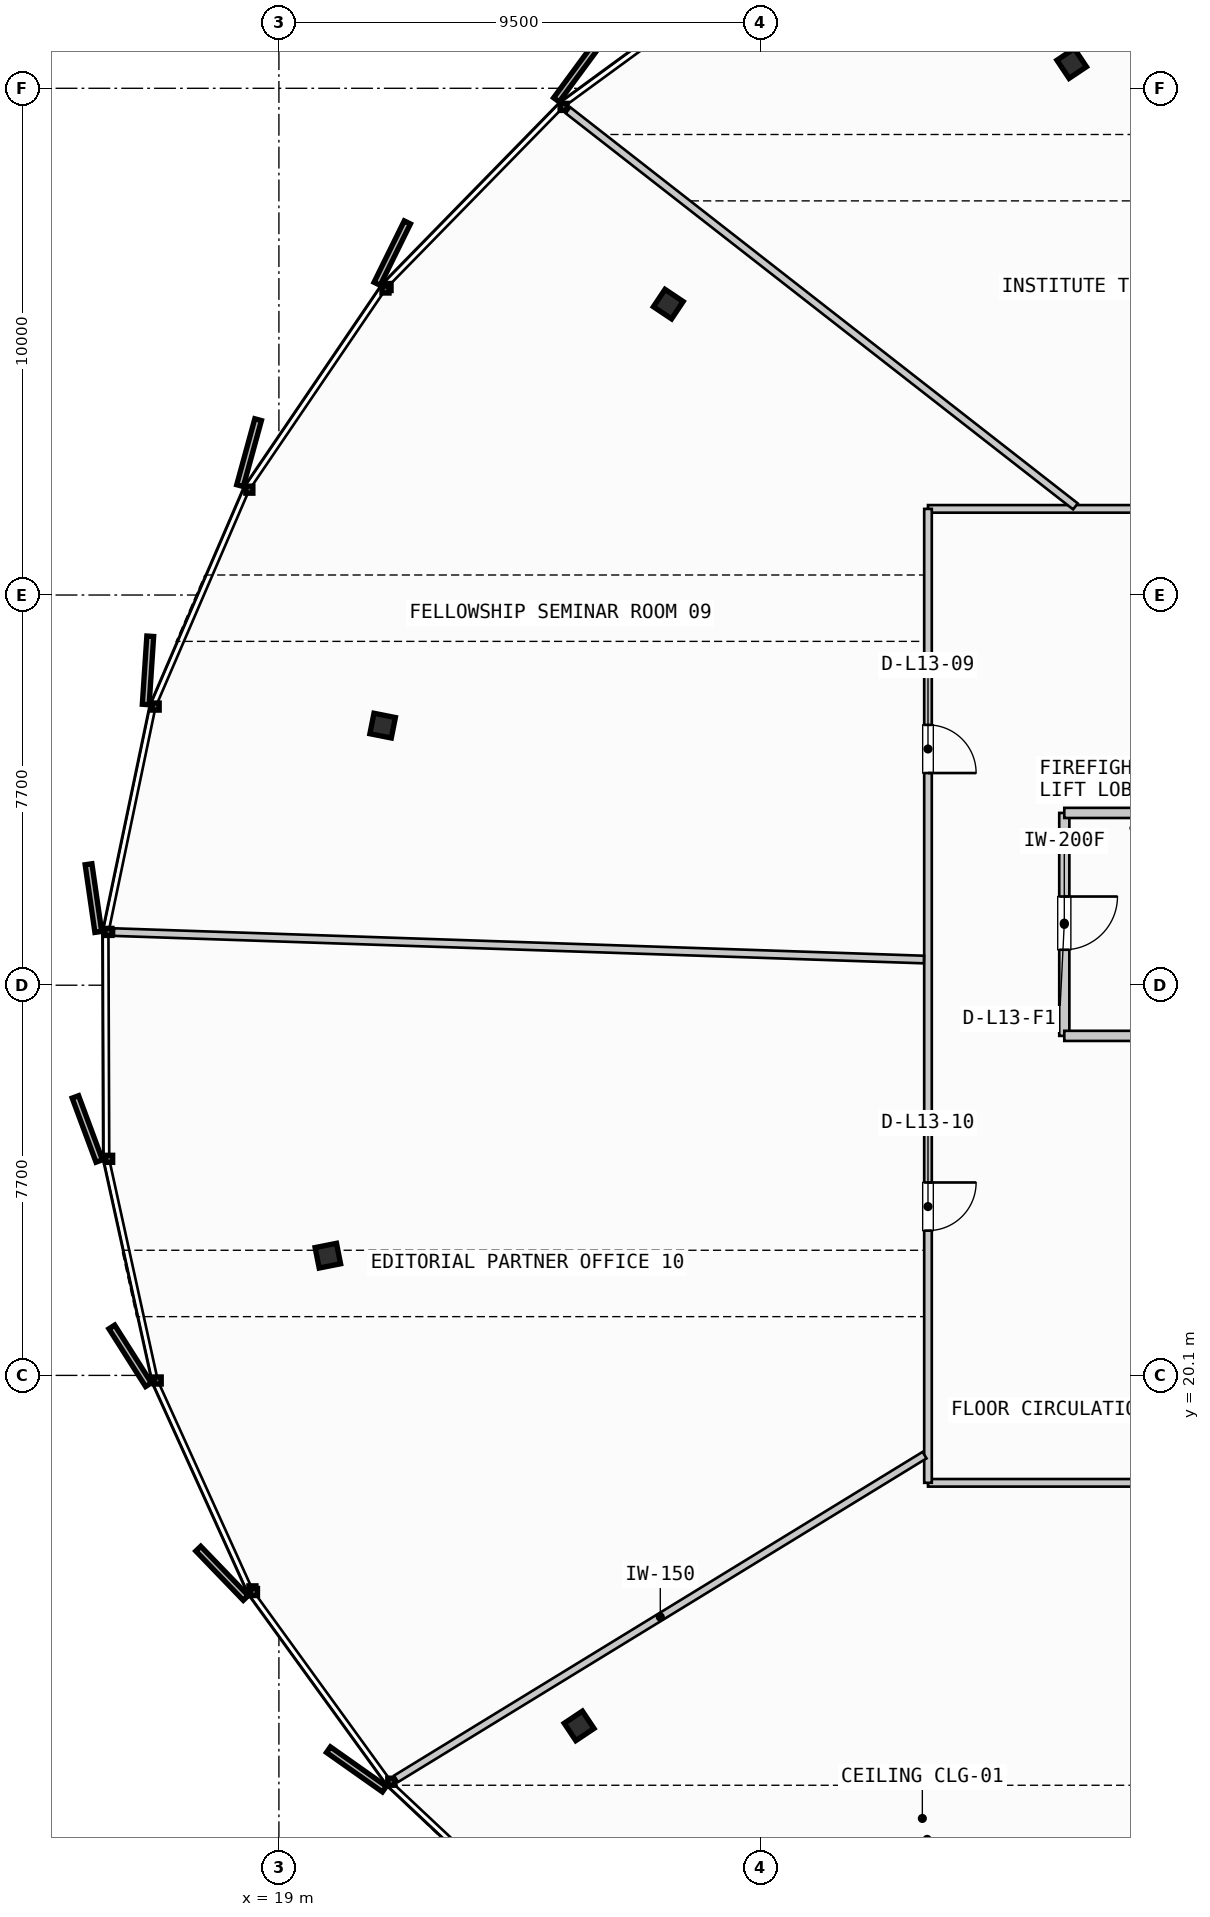
"""IFC4 building model, lengths in metres.
Left out: names, types, materials, properties, quantities, classifications, styles, units other than length and angle.
Written with IfcOpenShell. Run it as: python <this file> out.ifc"""

import sys

from ifc_helpers import new_model, si_unit, direction, frame, frame_2d, origin, origin_2d, place, context, subcontext, project, spatial, rectangle, i_section, extrude, source, transform, mapped, element, fill, save


model = new_model("IFC4")
c1 = context("Model", 3, precision=1e-05, world=origin(), true_north=direction((0.0, 1.0)))
c2 = subcontext(c1, "Body", "Model", "MODEL_VIEW")
j1 = project(units=[si_unit("LENGTHUNIT", "METRE"), si_unit("PLANEANGLEUNIT", "RADIAN")], contexts=[c1])
p1 = place(None, origin())
s1 = spatial("IfcSite", under=j1, at=p1, CompositionType="ELEMENT")
p2 = place(p1, origin())
s2 = spatial("IfcBuilding", under=s1, at=p2, CompositionType="ELEMENT")
p3 = place(p2, frame((0.0, 0.0, 56.2)))
s3 = spatial("IfcBuildingStorey", under=s2, at=p3, CompositionType="ELEMENT", Elevation=56.2)
m1 = source(origin(), c2, "Body", "SweptSolid", [
    extrude(i_section(OverallWidth=0.412, OverallDepth=0.431, WebThickness=0.042, FlangeThickness=0.068, FilletRadius=0.015, at=origin_2d()), origin(), (0.0, 0.0, 1.0), 3.55),
])
for number, where, z_axis, x_axis in (
    (1, (34.646, 45.99, 0.0), (0.0, 0.0, 1.0), (-0.556, 0.831, 0.0)),
    (2, (26.685, 41.241, 0.0), (0.0, 0.0, 1.0), (-0.831, 0.556, 0.0)),
    (3, (21.047, 32.923, 0.0), (0.0, 0.0, 1.0), (-0.981, 0.195, 0.0)),
    (4, (19.966, 22.462, 0.0), (0.0, 0.0, 1.0), (-0.981, -0.195, 0.0)),
    (5, (24.925, 13.183, 0.0), (0.0, 0.0, 1.0), (-0.831, -0.556, 0.0)),
):
    element("IfcColumn", number, at=place(p3, frame(where, z_axis=z_axis, x_axis=x_axis)), inside=s3, PredefinedType="COLUMN", context=c2, shape_type="MappedRepresentation", body=[
        mapped(m1, transform((0.0, 0.0, 0.0), scale=1.0)),
    ])
p4 = place(p3, frame((34.5, 31.2, 0.0), z_axis=(0.0, 0.0, 1.0), x_axis=(0.0, -1.0, 0.0)))
e6 = element("IfcWall", 6, at=p4, inside=s3, PredefinedType="PARTITIONING", context=c2, shape_type="SweptSolid", body=[
    extrude(rectangle(XDim=4.4, YDim=0.2, at=frame_2d((2.2, 0.0))), origin(), (0.0, 0.0, 1.0), 2.645),
])
p5 = place(p4, frame((1.65, 0.0, 0.0)))
e7 = element("IfcOpeningElement", 7, at=p5, cuts=e6, PredefinedType="OPENING", context=c2, shape_type="SweptSolid", body=[
    extrude(rectangle(XDim=1.05, YDim=2.15, at=frame_2d((0.525, 1.075))), frame((0.0, 0.11, 0.0), z_axis=(0.0, -1.0, 0.0), x_axis=(1.0, 0.0, 0.0)), (0.0, 0.0, 1.0), 0.22),
])
for number, where, z_axis, x_axis in (
    (8, (34.5, 26.8, 0.0), (0.0, 0.0, 1.0), (1.0, 0.0, 0.0)),
    (9, (34.5, 31.2, 0.0), (0.0, 0.0, 1.0), (1.0, 0.0, 0.0)),
):
    element("IfcWall", number, at=place(p3, frame(where, z_axis=z_axis, x_axis=x_axis)), inside=s3, PredefinedType="PARTITIONING", context=c2, shape_type="SweptSolid", body=[
        extrude(rectangle(XDim=3.14, YDim=0.2, at=frame_2d((1.57, 0.0))), origin(), (0.0, 0.0, 1.0), 2.645),
    ])
p6 = place(p3, frame((31.81, 17.98, 0.0), z_axis=(0.0, 0.0, 1.0), x_axis=(1.0, 0.0, 0.0)))
e10 = element("IfcWall", 10, at=p6, inside=s3, PredefinedType="PARTITIONING", context=c2, shape_type="SweptSolid", body=[
    extrude(rectangle(XDim=29.98, YDim=0.15, at=frame_2d((14.99, 0.0))), origin(), (0.0, 0.0, 1.0), 2.645),
])
p7 = place(p6, frame((5.749, 0.0, 0.0)))
e11 = element("IfcOpeningElement", 11, at=p7, cuts=e10, PredefinedType="OPENING", context=c2, shape_type="SweptSolid", body=[
    extrude(rectangle(XDim=0.95, YDim=2.15, at=frame_2d((0.475, 1.075))), frame((0.0, 0.085, 0.0), z_axis=(0.0, -1.0, 0.0), x_axis=(1.0, 0.0, 0.0)), (0.0, 0.0, 1.0), 0.17),
])
p8 = place(p6, frame((19.578, 0.0, 0.0)))
e12 = element("IfcOpeningElement", 12, at=p8, cuts=e10, PredefinedType="OPENING", context=c2, shape_type="SweptSolid", body=[
    extrude(rectangle(XDim=0.95, YDim=2.15, at=frame_2d((0.475, 1.075))), frame((0.0, 0.085, 0.0), z_axis=(0.0, -1.0, 0.0), x_axis=(1.0, 0.0, 0.0)), (0.0, 0.0, 1.0), 0.17),
])
p9 = place(p3, frame((61.79, 37.2, 0.0), z_axis=(0.0, 0.0, 1.0), x_axis=(-1.0, 0.0, 0.0)))
e13 = element("IfcWall", 13, at=p9, inside=s3, PredefinedType="PARTITIONING", context=c2, shape_type="SweptSolid", body=[
    extrude(rectangle(XDim=29.98, YDim=0.15, at=frame_2d((14.99, 0.0))), origin(), (0.0, 0.0, 1.0), 2.645),
])
p10 = place(p9, frame((3.251, 0.0, 0.0)))
e14 = element("IfcOpeningElement", 14, at=p10, cuts=e13, PredefinedType="OPENING", context=c2, shape_type="SweptSolid", body=[
    extrude(rectangle(XDim=0.95, YDim=2.15, at=frame_2d((0.475, 1.075))), frame((0.0, 0.085, 0.0), z_axis=(0.0, -1.0, 0.0), x_axis=(1.0, 0.0, 0.0)), (0.0, 0.0, 1.0), 0.17),
])
p11 = place(p9, frame((11.996, 0.0, 0.0)))
e15 = element("IfcOpeningElement", 15, at=p11, cuts=e13, PredefinedType="OPENING", context=c2, shape_type="SweptSolid", body=[
    extrude(rectangle(XDim=0.95, YDim=2.15, at=frame_2d((0.475, 1.075))), frame((0.0, 0.085, 0.0), z_axis=(0.0, -1.0, 0.0), x_axis=(1.0, 0.0, 0.0)), (0.0, 0.0, 1.0), 0.17),
])
p12 = place(p9, frame((22.188, 0.0, 0.0)))
e16 = element("IfcOpeningElement", 16, at=p12, cuts=e13, PredefinedType="OPENING", context=c2, shape_type="SweptSolid", body=[
    extrude(rectangle(XDim=0.95, YDim=2.15, at=frame_2d((0.475, 1.075))), frame((0.0, 0.085, 0.0), z_axis=(0.0, -1.0, 0.0), x_axis=(1.0, 0.0, 0.0)), (0.0, 0.0, 1.0), 0.17),
])
p13 = place(p3, frame((31.81, 37.2, 0.0), z_axis=(0.0, 0.0, 1.0), x_axis=(0.0, -1.0, 0.0)))
e17 = element("IfcWall", 17, at=p13, inside=s3, PredefinedType="PARTITIONING", context=c2, shape_type="SweptSolid", body=[
    extrude(rectangle(XDim=19.22, YDim=0.15, at=frame_2d((9.61, 0.0))), origin(), (0.0, 0.0, 1.0), 2.645),
])
p14 = place(p13, frame((4.263, 0.0, 0.0)))
e18 = element("IfcOpeningElement", 18, at=p14, cuts=e17, PredefinedType="OPENING", context=c2, shape_type="SweptSolid", body=[
    extrude(rectangle(XDim=0.95, YDim=2.15, at=frame_2d((0.475, 1.075))), frame((0.0, 0.085, 0.0), z_axis=(0.0, -1.0, 0.0), x_axis=(1.0, 0.0, 0.0)), (0.0, 0.0, 1.0), 0.17),
])
p15 = place(p13, frame((13.293, 0.0, 0.0)))
e19 = element("IfcOpeningElement", 19, at=p15, cuts=e17, PredefinedType="OPENING", context=c2, shape_type="SweptSolid", body=[
    extrude(rectangle(XDim=0.95, YDim=2.15, at=frame_2d((0.475, 1.075))), frame((0.0, 0.085, 0.0), z_axis=(0.0, -1.0, 0.0), x_axis=(1.0, 0.0, 0.0)), (0.0, 0.0, 1.0), 0.17),
])
p16 = place(p3, frame((31.742, 18.526, 0.0), z_axis=(0.0, 0.0, 1.0), x_axis=(-0.852795422603, -0.522245121746, 0.0)))
e20 = element("IfcWall", 20, at=p16, inside=s3, PredefinedType="PARTITIONING", context=c2, shape_type="SweptSolid", body=[
    extrude(rectangle(XDim=12.23, YDim=0.15, at=frame_2d((6.115, 0.0))), origin(), (0.0, 0.0, 1.0), 2.645),
])
p17 = place(p3, frame((34.719, 37.249, 0.0), z_axis=(0.0, 0.0, 1.0), x_axis=(-0.78829236469, 0.615300859556, 0.0)))
e21 = element("IfcWall", 21, at=p17, inside=s3, PredefinedType="PARTITIONING", context=c2, shape_type="SweptSolid", body=[
    extrude(rectangle(XDim=12.703, YDim=0.15, at=frame_2d((6.352, 0.0))), origin(), (0.0, 0.0, 1.0), 2.645),
])
p18 = place(p3, frame((31.73, 28.306, 0.0), z_axis=(0.0, 0.0, 1.0), x_axis=(-0.999426166125, 0.033872384993, 0.0)))
e22 = element("IfcWall", 22, at=p18, inside=s3, PredefinedType="PARTITIONING", context=c2, shape_type="SweptSolid", body=[
    extrude(rectangle(XDim=15.994, YDim=0.15, at=frame_2d((7.997, 0.0))), origin(), (0.0, 0.0, 1.0), 2.645),
])
m2 = source(origin(), c2, "Body", "SweptSolid", [
    extrude(rectangle(XDim=1.05, YDim=2.15, at=frame_2d((0.525, 1.075))), frame((0.0, 0.025, 0.0), z_axis=(0.0, -1.0, 0.0), x_axis=(1.0, 0.0, 0.0)), (0.0, 0.0, 1.0), 0.05),
])
p19 = place(p5, origin())
e23 = element("IfcDoor", 23, at=p19, inside=s3, OperationType="SINGLE_SWING_LEFT", PredefinedType="DOOR", context=c2, shape_type="MappedRepresentation", body=[
    mapped(m2, transform((0.0, 0.0, 0.0), scale=1.0)),
])
fill(e7, e23)
m3 = source(origin(), c2, "Body", "SweptSolid", [
    extrude(rectangle(XDim=0.95, YDim=2.15, at=frame_2d((0.475, 1.075))), frame((0.0, 0.025, 0.0), z_axis=(0.0, -1.0, 0.0), x_axis=(1.0, 0.0, 0.0)), (0.0, 0.0, 1.0), 0.05),
])
p20 = place(p14, origin())
e24 = element("IfcDoor", 24, at=p20, inside=s3, OperationType="SINGLE_SWING_RIGHT", PredefinedType="DOOR", context=c2, shape_type="MappedRepresentation", body=[
    mapped(m3, transform((0.0, 0.0, 0.0), scale=1.0)),
])
fill(e18, e24)
p21 = place(p15, origin())
e25 = element("IfcDoor", 25, at=p21, inside=s3, OperationType="SINGLE_SWING_LEFT", PredefinedType="DOOR", context=c2, shape_type="MappedRepresentation", body=[
    mapped(m3, transform((0.0, 0.0, 0.0), scale=1.0)),
])
fill(e19, e25)
save(model, sys.argv[1])
